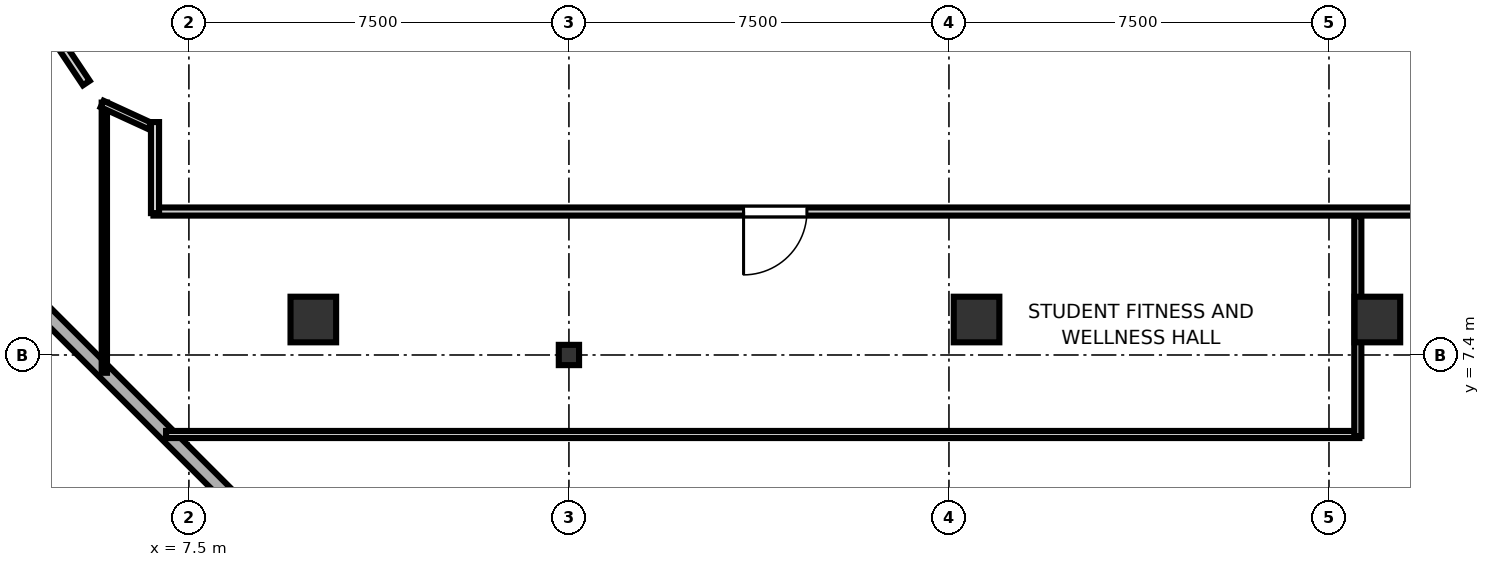
"""IFC4 building model, lengths in metres.
Left out: names, types, materials, properties, quantities, classifications, styles, units other than length and angle.
Written with IfcOpenShell. Run it as: python <this file> out.ifc"""

import sys

from ifc_helpers import new_model, si_unit, direction, frame, frame_2d, origin, origin_2d, place, context, subcontext, project, spatial, rectangle, i_section, extrude, element, fill, save


model = new_model("IFC4")
c1 = context("Model", 3, precision=1e-05, world=origin(), true_north=direction((0.0, 1.0)))
c2 = subcontext(c1, "Body", "Model", "MODEL_VIEW")
j1 = project(units=[si_unit("LENGTHUNIT", "METRE"), si_unit("PLANEANGLEUNIT", "RADIAN")], contexts=[c1])
p1 = place(None, origin())
s1 = spatial("IfcSite", under=j1, at=p1, CompositionType="ELEMENT")
p2 = place(p1, origin())
s2 = spatial("IfcBuilding", under=s1, at=p2, CompositionType="ELEMENT")
p3 = place(p2, frame((0.0, 0.0, 20.6)))
s3 = spatial("IfcBuildingStorey", under=s2, at=p3, CompositionType="ELEMENT", Elevation=20.6)
for number, where, z_axis, x_axis in (
    (1, (9.955, 8.1, 0.0), (0.0, 0.0, 1.0), (1.0, 0.0, 0.0)),
    (2, (23.045, 8.1, 0.0), (0.0, 0.0, 1.0), (1.0, 0.0, 0.0)),
    (3, (30.955, 8.1, 0.0), (0.0, 0.0, 1.0), (1.0, 0.0, 0.0)),
):
    element("IfcColumn", number, at=place(p3, frame(where, z_axis=z_axis, x_axis=x_axis)), inside=s3, PredefinedType="COLUMN", context=c2, shape_type="SweptSolid", body=[
        extrude(rectangle(XDim=0.9, YDim=0.9, at=origin_2d()), origin(), (0.0, 0.0, 1.0), 5.1),
    ])
p4 = place(p3, frame((15.0, 7.4, 0.0), z_axis=(0.0, 0.0, 1.0), x_axis=(1.0, 0.0, 0.0)))
e4 = element("IfcColumn", 4, at=p4, inside=s3, PredefinedType="COLUMN", context=c2, shape_type="SweptSolid", body=[
    extrude(i_section(OverallWidth=0.4, OverallDepth=0.4, WebThickness=0.013, FlangeThickness=0.021, at=origin_2d()), origin(), (0.0, 0.0, 1.0), 5.1),
])
p5 = place(p3, frame((4.2, 8.7, 0.0), z_axis=(0.0, 0.0, 1.0), x_axis=(0.707106781187, -0.707106781187, 0.0)))
e5 = element("IfcWall", 5, at=p5, inside=s3, PredefinedType="SOLIDWALL", context=c2, shape_type="SweptSolid", body=[
    extrude(rectangle(XDim=5.94, YDim=0.28, at=frame_2d((2.97, 0.0))), origin(), (0.0, 0.0, 1.0), 4.88),
])
p6 = place(p3, frame((67.2, 10.231, 0.0), z_axis=(0.0, 0.0, 1.0), x_axis=(-1.0, 0.0, 0.0)))
e6 = element("IfcWall", 6, at=p6, inside=s3, PredefinedType="PARTITIONING", context=c2, shape_type="SweptSolid", body=[
    extrude(rectangle(XDim=60.4, YDim=0.16, at=frame_2d((30.2, 0.0))), origin(), (0.0, 0.0, 1.0), 3.4),
])
p7 = place(p6, frame((47.503, 0.0, 0.0)))
e7 = element("IfcOpeningElement", 7, at=p7, cuts=e6, PredefinedType="OPENING", context=c2, shape_type="SweptSolid", body=[
    extrude(rectangle(XDim=1.25, YDim=2.2, at=frame_2d((0.625, 1.1))), frame((0.0, 0.09, 0.0), z_axis=(0.0, -1.0, 0.0), x_axis=(1.0, 0.0, 0.0)), (0.0, 0.0, 1.0), 0.18),
])
p8 = place(p6, frame((12.197, 0.0, 0.0)))
e8 = element("IfcOpeningElement", 8, at=p8, cuts=e6, PredefinedType="OPENING", context=c2, shape_type="SweptSolid", body=[
    extrude(rectangle(XDim=1.25, YDim=2.2, at=frame_2d((0.625, 1.1))), frame((0.0, 0.09, 0.0), z_axis=(0.0, -1.0, 0.0), x_axis=(1.0, 0.0, 0.0)), (0.0, 0.0, 1.0), 0.18),
])
p9 = place(p3, frame((6.831, 10.2, 0.0), z_axis=(0.0, 0.0, 1.0), x_axis=(0.0, 1.0, 0.0)))
e9 = element("IfcWall", 9, at=p9, inside=s3, PredefinedType="PARTITIONING", context=c2, shape_type="SweptSolid", body=[
    extrude(rectangle(XDim=1.796, YDim=0.16, at=frame_2d((0.898, 0.0))), origin(), (0.0, 0.0, 1.0), 3.4),
])
p10 = place(p3, frame((5.475, 12.767, 0.0), z_axis=(0.0, 0.0, 1.0), x_axis=(-0.555576038047, 0.831465733478, 0.0)))
e10 = element("IfcWall", 10, at=p10, inside=s3, PredefinedType="PARTITIONING", context=c2, shape_type="SweptSolid", body=[
    extrude(rectangle(XDim=2.315, YDim=0.16, at=frame_2d((1.157, 0.0))), origin(), (0.0, 0.0, 1.0), 3.4),
])
p11 = place(p3, frame((30.6, 5.831, 0.0), z_axis=(0.0, 0.0, 1.0), x_axis=(-1.0, 0.0, 0.0)))
e11 = element("IfcWall", 11, at=p11, inside=s3, PredefinedType="PARTITIONING", context=c2, shape_type="SweptSolid", body=[
    extrude(rectangle(XDim=23.551, YDim=0.14, at=frame_2d((11.775, 0.0))), origin(), (0.0, 0.0, 1.0), 3.4),
])
p12 = place(p3, frame((5.831, 7.049, 0.0), z_axis=(0.0, 0.0, 1.0), x_axis=(0.0, 1.0, 0.0)))
e12 = element("IfcWall", 12, at=p12, inside=s3, PredefinedType="PARTITIONING", context=c2, shape_type="SweptSolid", body=[
    extrude(rectangle(XDim=5.332, YDim=0.105, at=frame_2d((2.666, 0.0))), origin(), (0.0, 0.0, 1.0), 3.4),
])
p13 = place(p3, frame((5.787, 12.353, 0.0), z_axis=(0.0, 0.0, 1.0), x_axis=(0.908698668485, -0.417452667849, 0.0)))
e13 = element("IfcWall", 13, at=p13, inside=s3, PredefinedType="PARTITIONING", context=c2, shape_type="SweptSolid", body=[
    extrude(rectangle(XDim=1.032, YDim=0.14, at=frame_2d((0.516, 0.0))), origin(), (0.0, 0.0, 1.0), 3.4),
])
p14 = place(p3, frame((30.569, 10.138, 0.0), z_axis=(0.0, 0.0, 1.0), x_axis=(0.0, -1.0, 0.0)))
e14 = element("IfcWall", 14, at=p14, inside=s3, PredefinedType="PARTITIONING", context=c2, shape_type="SweptSolid", body=[
    extrude(rectangle(XDim=4.338, YDim=0.14, at=frame_2d((2.169, 0.0))), origin(), (0.0, 0.0, 1.0), 3.4),
])
p15 = place(p7, origin())
e15 = element("IfcDoor", 15, at=p15, inside=s3, OperationType="SINGLE_SWING_RIGHT", PredefinedType="DOOR", context=c2, shape_type="SweptSolid", body=[
    extrude(rectangle(XDim=1.25, YDim=2.2, at=frame_2d((0.625, 1.1))), frame((0.0, 0.025, 0.0), z_axis=(0.0, -1.0, 0.0), x_axis=(1.0, 0.0, 0.0)), (0.0, 0.0, 1.0), 0.05),
])
fill(e7, e15)
save(model, sys.argv[1])
